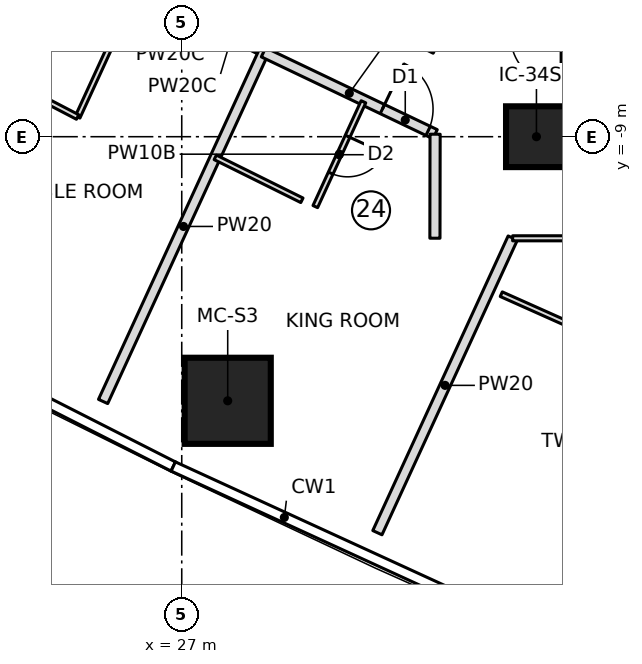
"""IFC4 building model, lengths in metres.
Left out: names, types, materials, properties, quantities, classifications, styles, units other than length and angle.
Written with IfcOpenShell. Run it as: python <this file> out.ifc"""

import sys

from ifc_helpers import new_model, si_unit, direction, frame, frame_2d, origin, origin_2d, place, context, subcontext, project, spatial, rectangle, extrude, element, fill, save


model = new_model("IFC4")
c1 = context("Model", 3, precision=1e-05, world=origin(), true_north=direction((0.0, 1.0)))
c2 = subcontext(c1, "Body", "Model", "MODEL_VIEW")
j1 = project(units=[si_unit("LENGTHUNIT", "METRE"), si_unit("PLANEANGLEUNIT", "RADIAN")], contexts=[c1])
p1 = place(None, origin())
s1 = spatial("IfcSite", under=j1, at=p1, CompositionType="ELEMENT")
p2 = place(p1, origin())
s2 = spatial("IfcBuilding", under=s1, at=p2, CompositionType="ELEMENT")
p3 = place(p2, frame((0.0, 0.0, 102.65)))
s3 = spatial("IfcBuildingStorey", under=s2, at=p3, CompositionType="ELEMENT", Elevation=102.65)
p4 = place(p3, frame((27.907, -14.212, 0.0), z_axis=(0.0, 0.0, 1.0), x_axis=(1.0, 0.0, 0.0)))
e1 = element("IfcColumn", 1, at=p4, inside=s3, PredefinedType="COLUMN", context=c2, shape_type="SweptSolid", body=[
    extrude(rectangle(XDim=1.7, YDim=1.7, at=origin_2d()), origin(), (0.0, 0.0, 1.0), 3.55),
])
p5 = place(p3, frame((34.0, -9.0, 0.0), z_axis=(0.0, 0.0, 1.0), x_axis=(1.0, 0.0, 0.0)))
e2 = element("IfcColumn", 2, at=p5, inside=s3, PredefinedType="COLUMN", context=c2, shape_type="SweptSolid", body=[
    extrude(rectangle(XDim=1.2, YDim=1.2, at=origin_2d()), origin(), (0.0, 0.0, 1.0), 3.55),
])
p6 = place(p3, frame((23.266, -4.602, 0.0), z_axis=(0.0, 0.0, 1.0), x_axis=(0.892007141151, -0.452021304958, 0.0)))
e3 = element("IfcWall", 3, at=p6, inside=s3, PredefinedType="PARTITIONING", context=c2, shape_type="SweptSolid", body=[
    extrude(rectangle(XDim=6.004, YDim=0.2, at=frame_2d((3.002, 0.0))), origin(), (0.0, 0.0, 1.0), 3.25),
])
p7 = place(p6, frame((3.7, 0.0, 0.0)))
e4 = element("IfcOpeningElement", 4, at=p7, cuts=e3, PredefinedType="OPENING", context=c2, shape_type="SweptSolid", body=[
    extrude(rectangle(XDim=1.0, YDim=2.1, at=frame_2d((0.5, 1.05))), frame((0.0, 0.11, 0.0), z_axis=(0.0, -1.0, 0.0), x_axis=(1.0, 0.0, 0.0)), (0.0, 0.0, 1.0), 0.22),
])
p8 = place(p3, frame((26.106, -6.085, 0.0), z_axis=(0.0, 0.0, 1.0), x_axis=(-0.417431588167, -0.908708352113, 0.0)))
e5 = element("IfcWall", 5, at=p8, inside=s3, PredefinedType="PARTITIONING", context=c2, shape_type="SweptSolid", body=[
    extrude(rectangle(XDim=2.781, YDim=0.1, at=frame_2d((1.39, 0.0))), origin(), (0.0, 0.0, 1.0), 3.25),
])
p9 = place(p3, frame((24.945, -8.612, 0.0), z_axis=(0.0, 0.0, 1.0), x_axis=(-0.886865947566, 0.46202682936, 0.0)))
e6 = element("IfcWall", 6, at=p9, inside=s3, PredefinedType="PARTITIONING", context=c2, shape_type="SweptSolid", body=[
    extrude(rectangle(XDim=3.204, YDim=0.1, at=frame_2d((1.602, 0.0))), origin(), (0.0, 0.0, 1.0), 3.25),
])
p10 = place(p9, frame((1.2, 0.0, 0.0)))
e7 = element("IfcOpeningElement", 7, at=p10, cuts=e6, PredefinedType="OPENING", context=c2, shape_type="SweptSolid", body=[
    extrude(rectangle(XDim=0.8, YDim=2.1, at=frame_2d((0.4, 1.05))), frame((0.0, 0.06, 0.0), z_axis=(0.0, -1.0, 0.0), x_axis=(1.0, 0.0, 0.0)), (0.0, 0.0, 1.0), 0.12),
])
p11 = place(p3, frame((25.448, -14.226, 0.0), z_axis=(0.0, 0.0, 1.0), x_axis=(0.417428513692, 0.908709764422, 0.0)))
e8 = element("IfcWall", 8, at=p11, inside=s3, PredefinedType="PARTITIONING", context=c2, shape_type="SweptSolid", body=[
    extrude(rectangle(XDim=7.603, YDim=0.2, at=frame_2d((3.802, 0.0))), origin(), (0.0, 0.0, 1.0), 3.25),
])
p12 = place(p3, frame((28.613, -7.335, 0.0), z_axis=(0.0, 0.0, 1.0), x_axis=(0.902499429765, -0.430691048518, 0.0)))
e9 = element("IfcWall", 9, at=p12, inside=s3, PredefinedType="PARTITIONING", context=c2, shape_type="SweptSolid", body=[
    extrude(rectangle(XDim=3.753, YDim=0.2, at=frame_2d((1.876, 0.0))), origin(), (0.0, 0.0, 1.0), 3.25),
])
p13 = place(p12, frame((2.6, 0.0, 0.0)))
e10 = element("IfcOpeningElement", 10, at=p13, cuts=e9, PredefinedType="OPENING", context=c2, shape_type="SweptSolid", body=[
    extrude(rectangle(XDim=1.0, YDim=2.1, at=frame_2d((0.5, 1.05))), frame((0.0, 0.11, 0.0), z_axis=(0.0, -1.0, 0.0), x_axis=(1.0, 0.0, 0.0)), (0.0, 0.0, 1.0), 0.22),
])
p14 = place(p3, frame((30.586, -8.31, 0.0), z_axis=(0.0, 0.0, 1.0), x_axis=(-0.417466676952, -0.908692232626, 0.0)))
e11 = element("IfcWall", 11, at=p14, inside=s3, PredefinedType="PARTITIONING", context=c2, shape_type="SweptSolid", body=[
    extrude(rectangle(XDim=2.277, YDim=0.1, at=frame_2d((1.139, 0.0))), origin(), (0.0, 0.0, 1.0), 3.25),
])
p15 = place(p14, frame((0.75, 0.0, 0.0)))
e12 = element("IfcOpeningElement", 12, at=p15, cuts=e11, PredefinedType="OPENING", context=c2, shape_type="SweptSolid", body=[
    extrude(rectangle(XDim=0.8, YDim=2.1, at=frame_2d((0.4, 1.05))), frame((0.0, 0.06, 0.0), z_axis=(0.0, -1.0, 0.0), x_axis=(1.0, 0.0, 0.0)), (0.0, 0.0, 1.0), 0.12),
])
p16 = place(p3, frame((29.371, -10.255, 0.0), z_axis=(0.0, 0.0, 1.0), x_axis=(-0.895982200486, 0.444089964324, 0.0)))
e13 = element("IfcWall", 13, at=p16, inside=s3, PredefinedType="PARTITIONING", context=c2, shape_type="SweptSolid", body=[
    extrude(rectangle(XDim=1.909, YDim=0.1, at=frame_2d((0.954, 0.0))), origin(), (0.0, 0.0, 1.0), 3.25),
])
p17 = place(p3, frame((30.861, -16.815, 0.0), z_axis=(0.0, 0.0, 1.0), x_axis=(0.417441426461, 0.908703832651, 0.0)))
e14 = element("IfcWall", 14, at=p17, inside=s3, PredefinedType="PARTITIONING", context=c2, shape_type="SweptSolid", body=[
    extrude(rectangle(XDim=6.399, YDim=0.2, at=frame_2d((3.2, 0.0))), origin(), (0.0, 0.0, 1.0), 3.25),
])
p18 = place(p3, frame((35.354, -13.023, 0.0), z_axis=(0.0, 0.0, 1.0), x_axis=(-0.913060453705, 0.407824236504, 0.0)))
e15 = element("IfcWall", 15, at=p18, inside=s3, PredefinedType="PARTITIONING", context=c2, shape_type="SweptSolid", body=[
    extrude(rectangle(XDim=2.243, YDim=0.1, at=frame_2d((1.122, 0.0))), origin(), (0.0, 0.0, 1.0), 3.25),
])
p19 = place(p3, frame((33.53, -11.005, 0.0), z_axis=(0.0, 0.0, 1.0), x_axis=(1.0, 0.0, 0.0)))
e16 = element("IfcWall", 16, at=p19, inside=s3, PredefinedType="PARTITIONING", context=c2, shape_type="SweptSolid", body=[
    extrude(rectangle(XDim=2.47, YDim=0.1, at=frame_2d((1.235, 0.0))), origin(), (0.0, 0.0, 1.0), 3.25),
])
p20 = place(p3, frame((31.995, -7.285, 0.0), z_axis=(0.0, 0.0, 1.0), x_axis=(-0.89773510237, 0.440535680702, 0.0)))
e17 = element("IfcWall", 17, at=p20, inside=s3, PredefinedType="PARTITIONING", context=c2, shape_type="SweptSolid", body=[
    extrude(rectangle(XDim=2.549, YDim=0.15, at=frame_2d((1.275, 0.0))), origin(), (0.0, 0.0, 1.0), 3.25),
])
p21 = place(p3, frame((32.0, -8.951, 0.0), z_axis=(0.0, 0.0, 1.0), x_axis=(-0.001665276625, -0.999998613426, 0.0)))
e18 = element("IfcWall", 18, at=p21, inside=s3, PredefinedType="PARTITIONING", context=c2, shape_type="SweptSolid", body=[
    extrude(rectangle(XDim=2.052, YDim=0.2, at=frame_2d((1.026, 0.0))), origin(), (0.0, 0.0, 1.0), 3.25),
])
p22 = place(p15, origin())
e19 = element("IfcDoor", 19, at=p22, inside=s3, OperationType="SINGLE_SWING_LEFT", PredefinedType="DOOR", context=c2, shape_type="SweptSolid", body=[
    extrude(rectangle(XDim=0.8, YDim=2.1, at=frame_2d((0.4, 1.05))), frame((0.0, 0.025, 0.0), z_axis=(0.0, -1.0, 0.0), x_axis=(1.0, 0.0, 0.0)), (0.0, 0.0, 1.0), 0.05),
])
fill(e12, e19)
p23 = place(p13, origin())
e20 = element("IfcDoor", 20, at=p23, inside=s3, OperationType="SINGLE_SWING_LEFT", PredefinedType="DOOR", context=c2, shape_type="SweptSolid", body=[
    extrude(rectangle(XDim=1.0, YDim=2.1, at=frame_2d((0.5, 1.05))), frame((0.0, 0.025, 0.0), z_axis=(0.0, -1.0, 0.0), x_axis=(1.0, 0.0, 0.0)), (0.0, 0.0, 1.0), 0.05),
])
fill(e10, e20)
save(model, sys.argv[1])
